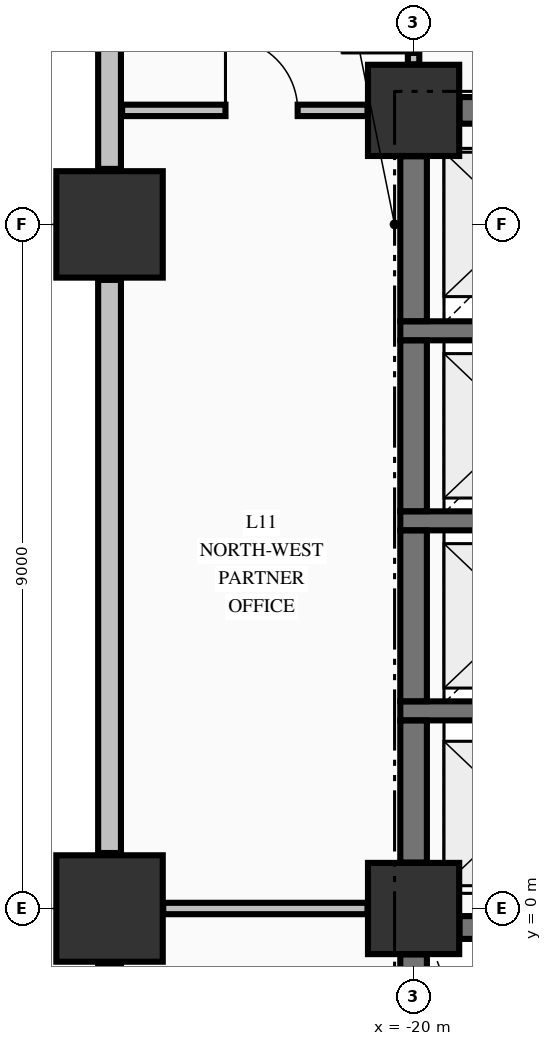
"""IFC4 building model, lengths in metres.
Left out: names, types, materials, properties, quantities, classifications, styles, units other than length and angle.
Written with IfcOpenShell. Run it as: python <this file> out.ifc"""

import sys

from ifc_helpers import new_model, si_unit, direction, frame, frame_2d, origin, origin_2d, place, context, subcontext, project, spatial, rectangle, extrude, element, fill, save


model = new_model("IFC4")
c1 = context("Model", 3, precision=1e-05, world=origin(), true_north=direction((0.0, 1.0)))
c2 = subcontext(c1, "Body", "Model", "MODEL_VIEW")
j1 = project(units=[si_unit("LENGTHUNIT", "METRE"), si_unit("PLANEANGLEUNIT", "RADIAN")], contexts=[c1])
p1 = place(None, origin())
s1 = spatial("IfcSite", under=j1, at=p1, CompositionType="ELEMENT")
p2 = place(p1, origin())
s2 = spatial("IfcBuilding", under=s1, at=p2, CompositionType="ELEMENT")
p3 = place(p2, frame((0.0, 0.0, 48.62)))
s3 = spatial("IfcBuildingStorey", under=s2, at=p3, CompositionType="ELEMENT", Elevation=48.62)
for number, where, z_axis, x_axis in (
    (1, (-24.0, 0.0, -0.25), (0.0, 0.0, 1.0), (1.0, 0.0, 0.0)),
    (2, (-24.0, 9.0, -0.25), (0.0, 0.0, 1.0), (1.0, 0.0, 0.0)),
):
    element("IfcColumn", number, at=place(p3, frame(where, z_axis=z_axis, x_axis=x_axis)), inside=s3, PredefinedType="COLUMN", context=c2, shape_type="SweptSolid", body=[
        extrude(rectangle(XDim=1.4, YDim=1.4, at=origin_2d()), origin(), (0.0, 0.0, 1.0), 3.395),
    ])
for number, where, z_axis, x_axis in (
    (3, (-20.0, 10.5, -0.25), (0.0, 0.0, 1.0), (1.0, 0.0, 0.0)),
    (4, (-20.0, 0.0, -0.25), (0.0, 0.0, 1.0), (1.0, 0.0, 0.0)),
):
    element("IfcColumn", number, at=place(p3, frame(where, z_axis=z_axis, x_axis=x_axis)), inside=s3, PredefinedType="COLUMN", context=c2, shape_type="SweptSolid", body=[
        extrude(rectangle(XDim=1.2, YDim=1.2, at=origin_2d()), origin(), (0.0, 0.0, 1.0), 3.395),
    ])
for number, where, z_axis, x_axis in (
    (5, (-24.0, -0.73, 0.0), (0.0, 0.0, 1.0), (0.0, -1.0, 0.0)),
    (6, (-24.0, 8.27, 0.0), (0.0, 0.0, 1.0), (0.0, -1.0, 0.0)),
):
    element("IfcWall", number, at=place(p3, frame(where, z_axis=z_axis, x_axis=x_axis)), inside=s3, PredefinedType="STANDARD", context=c2, shape_type="SweptSolid", body=[
        extrude(rectangle(XDim=7.54, YDim=0.3, at=frame_2d((3.77, 0.0))), origin(), (0.0, 0.0, 1.0), 2.537),
    ])
p4 = place(p3, frame((-24.0, 22.27, 0.0), z_axis=(0.0, 0.0, 1.0), x_axis=(0.0, -1.0, 0.0)))
e7 = element("IfcWall", 7, at=p4, inside=s3, PredefinedType="STANDARD", context=c2, shape_type="SweptSolid", body=[
    extrude(rectangle(XDim=12.54, YDim=0.3, at=frame_2d((6.27, 0.0))), origin(), (0.0, 0.0, 1.0), 2.537),
])
p5 = place(p3, frame((-19.396, -0.25, 0.0), z_axis=(0.0, 0.0, 1.0), x_axis=(1.0, 0.0, 0.0)))
e8 = element("IfcWall", 8, at=p5, inside=s3, PredefinedType="SHEAR", context=c2, shape_type="SweptSolid", body=[
    extrude(rectangle(XDim=7.792, YDim=0.3, at=frame_2d((3.896, 0.0))), origin(), (0.0, 0.0, 1.0), 3.145),
])
p6 = place(p5, frame((5.696, 0.0, 0.0)))
e9 = element("IfcOpeningElement", 9, at=p6, cuts=e8, PredefinedType="OPENING", context=c2, shape_type="SweptSolid", body=[
    extrude(rectangle(XDim=1.1, YDim=2.15, at=frame_2d((0.55, 1.075))), frame((0.0, 0.16, 0.0), z_axis=(0.0, -1.0, 0.0), x_axis=(1.0, 0.0, 0.0)), (0.0, 0.0, 1.0), 0.32),
])
for number, where, z_axis, x_axis in (
    (10, (-20.175, 2.6, 0.0), (0.0, 0.0, 1.0), (1.0, 0.0, 0.0)),
    (11, (-20.175, 5.1, 0.0), (0.0, 0.0, 1.0), (1.0, 0.0, 0.0)),
    (12, (-20.175, 7.6, 0.0), (0.0, 0.0, 1.0), (1.0, 0.0, 0.0)),
):
    element("IfcWall", number, at=place(p3, frame(where, z_axis=z_axis, x_axis=x_axis)), inside=s3, PredefinedType="SOLIDWALL", context=c2, shape_type="SweptSolid", body=[
        extrude(rectangle(XDim=3.1, YDim=0.25, at=frame_2d((1.55, 0.0))), origin(), (0.0, 0.0, 1.0), 3.145),
    ])
p7 = place(p3, frame((-19.396, 10.5, 0.0), z_axis=(0.0, 0.0, 1.0), x_axis=(1.0, 0.0, 0.0)))
e13 = element("IfcWall", 13, at=p7, inside=s3, PredefinedType="SHEAR", context=c2, shape_type="SweptSolid", body=[
    extrude(rectangle(XDim=4.696, YDim=0.35, at=frame_2d((2.348, 0.0))), origin(), (0.0, 0.0, 1.0), 3.145),
])
p8 = place(p7, frame((2.796, 0.0, 0.0)))
e14 = element("IfcOpeningElement", 14, at=p8, cuts=e13, PredefinedType="OPENING", context=c2, shape_type="SweptSolid", body=[
    extrude(rectangle(XDim=1.2, YDim=2.15, at=frame_2d((0.6, 1.075))), frame((0.0, 0.185, 0.0), z_axis=(0.0, -1.0, 0.0), x_axis=(1.0, 0.0, 0.0)), (0.0, 0.0, 1.0), 0.37),
])
p9 = place(p3, frame((-23.294, 0.0, 0.0), z_axis=(0.0, 0.0, 1.0), x_axis=(1.0, 0.0, 0.0)))
e15 = element("IfcWall", 15, at=p9, inside=s3, PredefinedType="PARTITIONING", context=c2, shape_type="SweptSolid", body=[
    extrude(rectangle(XDim=2.688, YDim=0.15, at=frame_2d((1.344, 0.0))), origin(), (0.0, 0.0, 1.0), 2.485),
])
p10 = place(p3, frame((-23.835, 10.5, 0.0), z_axis=(0.0, 0.0, 1.0), x_axis=(1.0, 0.0, 0.0)))
e16 = element("IfcWall", 16, at=p10, inside=s3, PredefinedType="PARTITIONING", context=c2, shape_type="SweptSolid", body=[
    extrude(rectangle(XDim=3.229, YDim=0.15, at=frame_2d((1.615, 0.0))), origin(), (0.0, 0.0, 1.0), 3.145),
])
p11 = place(p10, frame((1.36, 0.0, 0.0)))
e17 = element("IfcOpeningElement", 17, at=p11, cuts=e16, PredefinedType="OPENING", context=c2, shape_type="SweptSolid", body=[
    extrude(rectangle(XDim=0.95, YDim=2.15, at=frame_2d((0.475, 1.075))), frame((0.0, 0.085, 0.0), z_axis=(0.0, -1.0, 0.0), x_axis=(1.0, 0.0, 0.0)), (0.0, 0.0, 1.0), 0.17),
])
p12 = place(p3, frame((-20.0, -9.346, 0.0), z_axis=(0.0, 0.0, 1.0), x_axis=(0.0, 1.0, 0.0)))
e18 = element("IfcWall", 18, at=p12, inside=s3, PredefinedType="SHEAR", context=c2, shape_type="SweptSolid", body=[
    extrude(rectangle(XDim=8.742, YDim=0.35, at=frame_2d((4.371, 0.0))), origin(), (0.0, 0.0, 1.0), 3.145),
])
p13 = place(p3, frame((-20.0, 0.604, 0.0), z_axis=(0.0, 0.0, 1.0), x_axis=(0.0, 1.0, 0.0)))
e19 = element("IfcWall", 19, at=p13, inside=s3, PredefinedType="SHEAR", context=c2, shape_type="SweptSolid", body=[
    extrude(rectangle(XDim=1.869, YDim=0.35, at=frame_2d((0.935, 0.0))), origin(), (0.0, 0.0, 1.0), 3.145),
])
for number, where, z_axis, x_axis in (
    (20, (-20.0, 2.727, 0.0), (0.0, 0.0, 1.0), (0.0, 1.0, 0.0)),
    (21, (-20.0, 5.227, 0.0), (0.0, 0.0, 1.0), (0.0, 1.0, 0.0)),
):
    element("IfcWall", number, at=place(p3, frame(where, z_axis=z_axis, x_axis=x_axis)), inside=s3, PredefinedType="SHEAR", context=c2, shape_type="SweptSolid", body=[
        extrude(rectangle(XDim=2.246, YDim=0.35, at=frame_2d((1.123, 0.0))), origin(), (0.0, 0.0, 1.0), 3.145),
    ])
p14 = place(p3, frame((-20.0, 7.727, 0.0), z_axis=(0.0, 0.0, 1.0), x_axis=(0.0, 1.0, 0.0)))
e22 = element("IfcWall", 22, at=p14, inside=s3, PredefinedType="SHEAR", context=c2, shape_type="SweptSolid", body=[
    extrude(rectangle(XDim=2.169, YDim=0.35, at=frame_2d((1.084, 0.0))), origin(), (0.0, 0.0, 1.0), 3.145),
])
p15 = place(p3, frame((-20.0, 11.106, 0.0), z_axis=(0.0, 0.0, 1.0), x_axis=(0.0, 1.0, 0.0)))
e23 = element("IfcWall", 23, at=p15, inside=s3, PredefinedType="PARTITIONING", context=c2, shape_type="SweptSolid", body=[
    extrude(rectangle(XDim=1.766, YDim=0.15, at=frame_2d((0.883, 0.0))), origin(), (0.0, 0.0, 1.0), 3.145),
])
p16 = place(p15, frame((0.15, 0.0, 0.0)))
e24 = element("IfcOpeningElement", 24, at=p16, cuts=e23, PredefinedType="OPENING", context=c2, shape_type="SweptSolid", body=[
    extrude(rectangle(XDim=0.95, YDim=2.15, at=frame_2d((0.475, 1.075))), frame((0.0, 0.085, 0.0), z_axis=(0.0, -1.0, 0.0), x_axis=(1.0, 0.0, 0.0)), (0.0, 0.0, 1.0), 0.17),
])
p17 = place(p16, origin())
e25 = element("IfcDoor", 25, at=p17, inside=s3, OperationType="SINGLE_SWING_LEFT", PredefinedType="DOOR", context=c2, shape_type="SweptSolid", body=[
    extrude(rectangle(XDim=0.95, YDim=2.15, at=frame_2d((0.475, 1.075))), frame((0.0, 0.025, 0.0), z_axis=(0.0, -1.0, 0.0), x_axis=(1.0, 0.0, 0.0)), (0.0, 0.0, 1.0), 0.05),
])
fill(e24, e25)
p18 = place(p11, origin())
e26 = element("IfcDoor", 26, at=p18, inside=s3, OperationType="SINGLE_SWING_LEFT", PredefinedType="DOOR", context=c2, shape_type="SweptSolid", body=[
    extrude(rectangle(XDim=0.95, YDim=2.15, at=frame_2d((0.475, 1.075))), frame((0.0, 0.025, 0.0), z_axis=(0.0, -1.0, 0.0), x_axis=(1.0, 0.0, 0.0)), (0.0, 0.0, 1.0), 0.05),
])
fill(e17, e26)
save(model, sys.argv[1])
